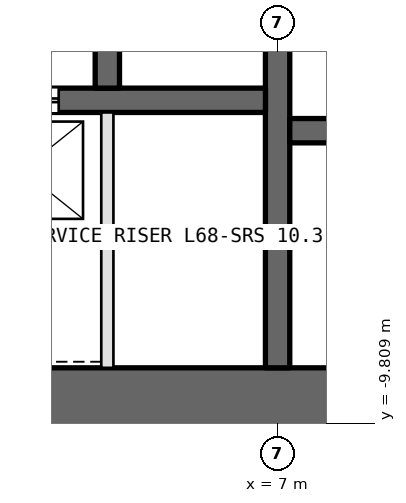
"""IFC4 building model, lengths in metres.
Left out: names, types, materials, properties, quantities, classifications, styles, units other than length and angle.
Written with IfcOpenShell. Run it as: python <this file> out.ifc"""

import sys

from ifc_helpers import new_model, si_unit, direction, frame, frame_2d, origin, place, context, subcontext, project, spatial, rectangle, extrude, element, fill, save


model = new_model("IFC4")
c1 = context("Model", 3, precision=1e-05, world=origin(), true_north=direction((0.0, 1.0)))
c2 = subcontext(c1, "Body", "Model", "MODEL_VIEW")
j1 = project(units=[si_unit("LENGTHUNIT", "METRE"), si_unit("PLANEANGLEUNIT", "RADIAN")], contexts=[c1])
p1 = place(None, origin())
s1 = spatial("IfcSite", under=j1, at=p1, CompositionType="ELEMENT")
p2 = place(p1, origin())
s2 = spatial("IfcBuilding", under=s1, at=p2, CompositionType="ELEMENT")
p3 = place(p2, frame((0.0, 0.0, 304.8)))
s3 = spatial("IfcBuildingStorey", under=s2, at=p3, CompositionType="ELEMENT", Elevation=304.8)
p4 = place(p3, frame((-13.9, -9.4, 0.0), z_axis=(0.0, 0.0, 1.0), x_axis=(1.0, 0.0, 0.0)))
e1 = element("IfcWall", 1, at=p4, inside=s3, PredefinedType="SHEAR", context=c2, shape_type="SweptSolid", body=[
    extrude(rectangle(XDim=27.8, YDim=1.0, at=frame_2d((13.9, 0.0))), origin(), (0.0, 0.0, 1.0), 4.2),
])
p5 = place(p4, frame((22.95, 0.0, 0.0)))
e2 = element("IfcOpeningElement", 2, at=p5, cuts=e1, PredefinedType="OPENING", context=c2, shape_type="SweptSolid", body=[
    extrude(rectangle(XDim=2.2, YDim=2.7, at=frame_2d((1.1, 1.35))), frame((0.0, 0.51, 0.0), z_axis=(0.0, -1.0, 0.0), x_axis=(1.0, 0.0, 0.0)), (0.0, 0.0, 1.0), 1.02),
])
p6 = place(p3, frame((7.0, -8.9, 0.0), z_axis=(0.0, 0.0, 1.0), x_axis=(0.0, 1.0, 0.0)))
e3 = element("IfcWall", 3, at=p6, inside=s3, PredefinedType="SHEAR", context=c2, shape_type="SweptSolid", body=[
    extrude(rectangle(XDim=17.8, YDim=0.4, at=frame_2d((8.9, 0.0))), origin(), (0.0, 0.0, 1.0), 4.2),
])
p7 = place(p6, frame((8.0, 0.0, 0.0)))
e4 = element("IfcOpeningElement", 4, at=p7, cuts=e3, PredefinedType="OPENING", context=c2, shape_type="SweptSolid", body=[
    extrude(rectangle(XDim=1.8, YDim=2.4, at=frame_2d((0.9, 1.2))), frame((0.0, 0.21, 0.0), z_axis=(0.0, -1.0, 0.0), x_axis=(1.0, 0.0, 0.0)), (0.0, 0.0, 1.0), 0.42),
])
p8 = place(p3, frame((-6.8, -4.5, 0.0), z_axis=(0.0, 0.0, 1.0), x_axis=(1.0, 0.0, 0.0)))
e5 = element("IfcWall", 5, at=p8, inside=s3, PredefinedType="SHEAR", context=c2, shape_type="SweptSolid", body=[
    extrude(rectangle(XDim=13.6, YDim=0.4, at=frame_2d((6.8, 0.0))), origin(), (0.0, 0.0, 1.0), 4.2),
])
p9 = place(p8, frame((0.7, 0.0, 0.0)))
e6 = element("IfcOpeningElement", 6, at=p9, cuts=e5, PredefinedType="OPENING", context=c2, shape_type="SweptSolid", body=[
    extrude(rectangle(XDim=1.1, YDim=2.4, at=frame_2d((0.55, 1.2))), frame((0.0, 0.21, 0.0), z_axis=(0.0, -1.0, 0.0), x_axis=(1.0, 0.0, 0.0)), (0.0, 0.0, 1.0), 0.42),
])
p10 = place(p8, frame((3.5, 0.0, 0.0)))
e7 = element("IfcOpeningElement", 7, at=p10, cuts=e5, PredefinedType="OPENING", context=c2, shape_type="SweptSolid", body=[
    extrude(rectangle(XDim=1.1, YDim=2.4, at=frame_2d((0.55, 1.2))), frame((0.0, 0.21, 0.0), z_axis=(0.0, -1.0, 0.0), x_axis=(1.0, 0.0, 0.0)), (0.0, 0.0, 1.0), 0.42),
])
p11 = place(p8, frame((6.3, 0.0, 0.0)))
e8 = element("IfcOpeningElement", 8, at=p11, cuts=e5, PredefinedType="OPENING", context=c2, shape_type="SweptSolid", body=[
    extrude(rectangle(XDim=1.1, YDim=2.4, at=frame_2d((0.55, 1.2))), frame((0.0, 0.21, 0.0), z_axis=(0.0, -1.0, 0.0), x_axis=(1.0, 0.0, 0.0)), (0.0, 0.0, 1.0), 0.42),
])
p12 = place(p8, frame((9.1, 0.0, 0.0)))
e9 = element("IfcOpeningElement", 9, at=p12, cuts=e5, PredefinedType="OPENING", context=c2, shape_type="SweptSolid", body=[
    extrude(rectangle(XDim=1.1, YDim=2.4, at=frame_2d((0.55, 1.2))), frame((0.0, 0.21, 0.0), z_axis=(0.0, -1.0, 0.0), x_axis=(1.0, 0.0, 0.0)), (0.0, 0.0, 1.0), 0.42),
])
p13 = place(p3, frame((7.2, -5.0, 0.0), z_axis=(0.0, 0.0, 1.0), x_axis=(1.0, 0.0, 0.0)))
e10 = element("IfcWall", 10, at=p13, inside=s3, PredefinedType="SHEAR", context=c2, shape_type="SweptSolid", body=[
    extrude(rectangle(XDim=5.7, YDim=0.4, at=frame_2d((2.85, 0.0))), origin(), (0.0, 0.0, 1.0), 4.2),
])
p14 = place(p3, frame((4.2, -4.3, 0.0), z_axis=(0.0, 0.0, 1.0), x_axis=(0.0, 1.0, 0.0)))
e11 = element("IfcWall", 11, at=p14, inside=s3, PredefinedType="SHEAR", context=c2, shape_type="SweptSolid", body=[
    extrude(rectangle(XDim=2.5, YDim=0.4, at=frame_2d((1.25, 0.0))), origin(), (0.0, 0.0, 1.0), 4.2),
])
p15 = place(p3, frame((4.2, -4.7, 0.0), z_axis=(0.0, 0.0, 1.0), x_axis=(0.0, -1.0, 0.0)))
e12 = element("IfcWall", 12, at=p15, inside=s3, PredefinedType="PARTITIONING", context=c2, shape_type="SweptSolid", body=[
    extrude(rectangle(XDim=4.2, YDim=0.2, at=frame_2d((2.1, 0.0))), origin(), (0.0, 0.0, 1.0), 4.2),
])
p16 = place(p12, origin())
e13 = element("IfcDoor", 13, at=p16, inside=s3, OperationType="DOUBLE_DOOR_SLIDING", PredefinedType="DOOR", context=c2, shape_type="SweptSolid", body=[
    extrude(rectangle(XDim=1.1, YDim=2.4, at=frame_2d((0.55, 1.2))), frame((0.0, 0.025, 0.0), z_axis=(0.0, -1.0, 0.0), x_axis=(1.0, 0.0, 0.0)), (0.0, 0.0, 1.0), 0.05),
])
fill(e9, e13)
save(model, sys.argv[1])
